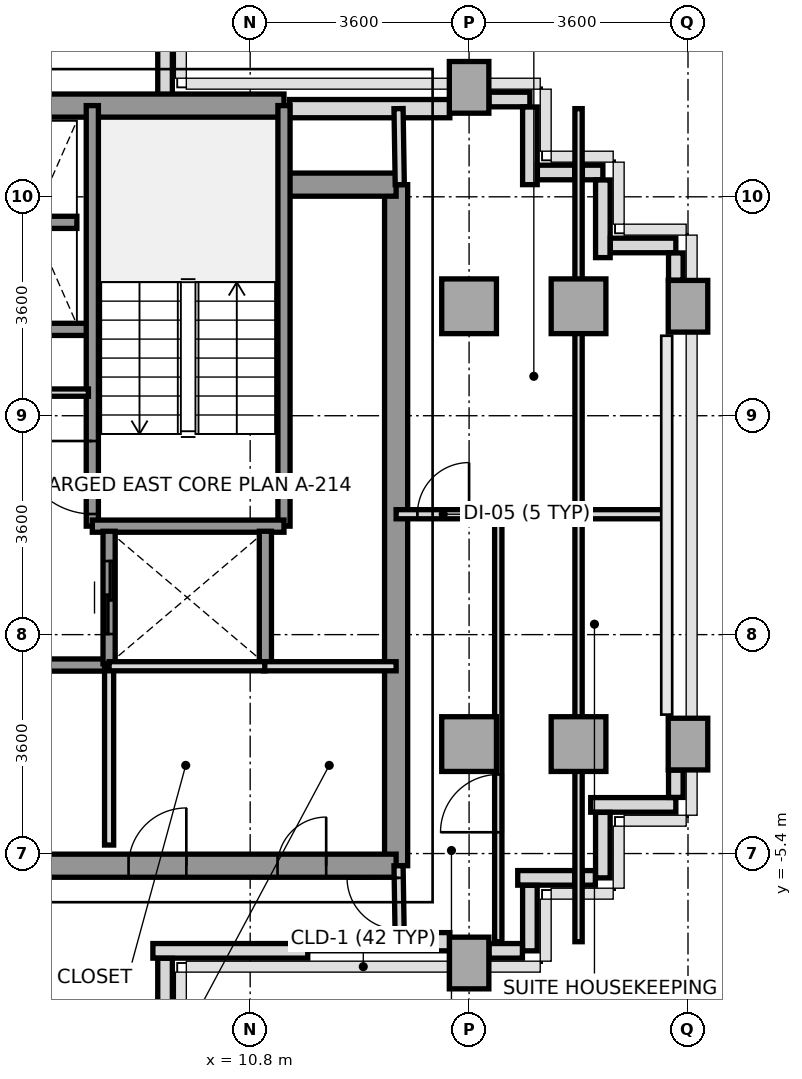
"""IFC4 building model, lengths in metres.
Left out: names, types, materials, properties, quantities, classifications, styles, units other than length and angle.
Written with IfcOpenShell. Run it as: python <this file> out.ifc"""

import sys

from ifc_helpers import new_model, si_unit, direction, frame, frame_2d, origin, origin_2d, place, context, subcontext, project, spatial, rectangle, extrude, source, transform, mapped, element, fill, save


model = new_model("IFC4")
c1 = context("Model", 3, precision=1e-05, world=origin(), true_north=direction((0.0, 1.0)))
c2 = subcontext(c1, "Body", "Model", "MODEL_VIEW")
j1 = project(units=[si_unit("LENGTHUNIT", "METRE"), si_unit("PLANEANGLEUNIT", "RADIAN")], contexts=[c1])
p1 = place(None, origin())
s1 = spatial("IfcSite", under=j1, at=p1, CompositionType="ELEMENT")
p2 = place(p1, origin())
s2 = spatial("IfcBuilding", under=s1, at=p2, CompositionType="ELEMENT")
p3 = place(p2, frame((0.0, 0.0, 201.2)))
s3 = spatial("IfcBuildingStorey", under=s2, at=p3, CompositionType="ELEMENT", Elevation=201.2)
m1 = source(origin(), c2, "Body", "SweptSolid", [
    extrude(rectangle(XDim=0.65, YDim=0.85, at=origin_2d()), origin(), (0.0, 0.0, 1.0), 3.2),
])
p4 = place(p3, frame((14.4, -7.2, 0.0), z_axis=(0.0, 0.0, 1.0), x_axis=(1.0, 0.0, 0.0)))
e1 = element("IfcColumn", 1, at=p4, inside=s3, PredefinedType="COLUMN", context=c2, shape_type="MappedRepresentation", body=[
    mapped(m1, transform((0.0, 0.0, 0.0), x_axis=(1.0, 0.0, 0.0), y_axis=(0.0, 1.0, 0.0), z_axis=(0.0, 0.0, 1.0), scale=1.0)),
])
m2 = source(origin(), c2, "Body", "SweptSolid", [
    extrude(rectangle(XDim=0.9, YDim=0.9, at=origin_2d()), origin(), (0.0, 0.0, 1.0), 3.2),
])
for number, where, z_axis, x_axis in (
    (2, (14.4, -3.6, 0.0), (0.0, 0.0, 1.0), (1.0, 0.0, 0.0)),
    (3, (14.4, 3.6, 0.0), (0.0, 0.0, 1.0), (1.0, 0.0, 0.0)),
):
    element("IfcColumn", number, at=place(p3, frame(where, z_axis=z_axis, x_axis=x_axis)), inside=s3, PredefinedType="COLUMN", context=c2, shape_type="MappedRepresentation", body=[
        mapped(m2, transform((0.0, 0.0, 0.0), x_axis=(1.0, 0.0, 0.0), y_axis=(0.0, 1.0, 0.0), z_axis=(0.0, 0.0, 1.0), scale=1.0)),
    ])
p5 = place(p3, frame((14.4, 7.2, 0.0), z_axis=(0.0, 0.0, 1.0), x_axis=(1.0, 0.0, 0.0)))
e4 = element("IfcColumn", 4, at=p5, inside=s3, PredefinedType="COLUMN", context=c2, shape_type="MappedRepresentation", body=[
    mapped(m1, transform((0.0, 0.0, 0.0), x_axis=(1.0, 0.0, 0.0), y_axis=(0.0, 1.0, 0.0), z_axis=(0.0, 0.0, 1.0), scale=1.0)),
])
for number, where, z_axis, x_axis in (
    (5, (16.2, -3.6, 0.0), (0.0, 0.0, 1.0), (1.0, 0.0, 0.0)),
    (6, (16.2, 3.6, 0.0), (0.0, 0.0, 1.0), (1.0, 0.0, 0.0)),
):
    element("IfcColumn", number, at=place(p3, frame(where, z_axis=z_axis, x_axis=x_axis)), inside=s3, PredefinedType="COLUMN", context=c2, shape_type="MappedRepresentation", body=[
        mapped(m2, transform((0.0, 0.0, 0.0), x_axis=(1.0, 0.0, 0.0), y_axis=(0.0, 1.0, 0.0), z_axis=(0.0, 0.0, 1.0), scale=1.0)),
    ])
for number, where, z_axis, x_axis in (
    (7, (18.0, -3.6, 0.0), (0.0, 0.0, 1.0), (1.0, 0.0, 0.0)),
    (8, (18.0, 3.6, 0.0), (0.0, 0.0, 1.0), (1.0, 0.0, 0.0)),
):
    element("IfcColumn", number, at=place(p3, frame(where, z_axis=z_axis, x_axis=x_axis)), inside=s3, PredefinedType="COLUMN", context=c2, shape_type="MappedRepresentation", body=[
        mapped(m1, transform((0.0, 0.0, 0.0), x_axis=(1.0, 0.0, 0.0), y_axis=(0.0, 1.0, 0.0), z_axis=(0.0, 0.0, 1.0), scale=1.0)),
    ])
p6 = place(p3, frame((11.448, 6.85, 0.0), z_axis=(0.0, 0.0, 1.0), x_axis=(1.0, 0.0, 0.0)))
e9 = element("IfcWall", 9, at=p6, inside=s3, PredefinedType="SOLIDWALL", context=c2, shape_type="SweptSolid", body=[
    extrude(rectangle(XDim=2.635, YDim=0.3, at=frame_2d((1.317, 0.0))), origin(), (0.0, 0.0, 1.0), 3.2),
])
p7 = place(p3, frame((11.75, -6.85, 0.0), z_axis=(0.0, 0.0, 1.0), x_axis=(1.0, 0.0, 0.0)))
e10 = element("IfcWall", 10, at=p7, inside=s3, PredefinedType="SOLIDWALL", context=c2, shape_type="SweptSolid", body=[
    extrude(rectangle(XDim=2.333, YDim=0.3, at=frame_2d((1.167, 0.0))), origin(), (0.0, 0.0, 1.0), 3.2),
])
p8 = place(p3, frame((17.8, -4.6, 0.0), z_axis=(0.0, 0.0, 1.0), x_axis=(-1.0, 0.0, 0.0)))
e11 = element("IfcWall", 11, at=p8, inside=s3, PredefinedType="PARAPET", context=c2, shape_type="SweptSolid", body=[
    extrude(rectangle(XDim=1.4, YDim=0.24, at=frame_2d((0.7, 0.0))), origin(), (0.0, 0.0, 1.0), 1.15),
])
p9 = place(p3, frame((16.6, -4.723, 0.0), z_axis=(0.0, 0.0, 1.0), x_axis=(0.0, -1.0, 0.0)))
e12 = element("IfcWall", 12, at=p9, inside=s3, PredefinedType="PARAPET", context=c2, shape_type="SweptSolid", body=[
    extrude(rectangle(XDim=1.077, YDim=0.24, at=frame_2d((0.539, 0.0))), origin(), (0.0, 0.0, 1.0), 1.15),
])
p10 = place(p3, frame((16.477, -5.8, 0.0), z_axis=(0.0, 0.0, 1.0), x_axis=(-1.0, 0.0, 0.0)))
e13 = element("IfcWall", 13, at=p10, inside=s3, PredefinedType="PARAPET", context=c2, shape_type="SweptSolid", body=[
    extrude(rectangle(XDim=0.214, YDim=0.24, at=frame_2d((0.107, 0.0))), origin(), (0.0, 0.0, 1.0), 1.15),
])
p11 = place(p3, frame((16.137, -5.8, 0.0), z_axis=(0.0, 0.0, 1.0), x_axis=(-1.0, 0.0, 0.0)))
e14 = element("IfcWall", 14, at=p11, inside=s3, PredefinedType="PARAPET", context=c2, shape_type="SweptSolid", body=[
    extrude(rectangle(XDim=0.937, YDim=0.24, at=frame_2d((0.469, 0.0))), origin(), (0.0, 0.0, 1.0), 1.15),
])
p12 = place(p3, frame((15.4, -5.923, 0.0), z_axis=(0.0, 0.0, 1.0), x_axis=(0.0, -1.0, 0.0)))
e15 = element("IfcWall", 15, at=p12, inside=s3, PredefinedType="PARAPET", context=c2, shape_type="SweptSolid", body=[
    extrude(rectangle(XDim=1.077, YDim=0.24, at=frame_2d((0.539, 0.0))), origin(), (0.0, 0.0, 1.0), 1.15),
])
p13 = place(p3, frame((15.277, -7.0, 0.0), z_axis=(0.0, 0.0, 1.0), x_axis=(-1.0, 0.0, 0.0)))
e16 = element("IfcWall", 16, at=p13, inside=s3, PredefinedType="PARAPET", context=c2, shape_type="SweptSolid", body=[
    extrude(rectangle(XDim=0.549, YDim=0.24, at=frame_2d((0.274, 0.0))), origin(), (0.0, 0.0, 1.0), 1.15),
])
p14 = place(p3, frame((11.747, -7.0, 0.0), z_axis=(0.0, 0.0, 1.0), x_axis=(-1.0, 0.0, 0.0)))
e17 = element("IfcWall", 17, at=p14, inside=s3, PredefinedType="PARAPET", context=c2, shape_type="SweptSolid", body=[
    extrude(rectangle(XDim=2.547, YDim=0.24, at=frame_2d((1.273, 0.0))), origin(), (0.0, 0.0, 1.0), 1.15),
])
p15 = place(p3, frame((9.4, -7.123, 0.0), z_axis=(0.0, 0.0, 1.0), x_axis=(0.0, -1.0, 0.0)))
e18 = element("IfcWall", 18, at=p15, inside=s3, PredefinedType="PARAPET", context=c2, shape_type="SweptSolid", body=[
    extrude(rectangle(XDim=1.424, YDim=0.24, at=frame_2d((0.712, 0.0))), origin(), (0.0, 0.0, 1.0), 1.15),
])
p16 = place(p3, frame((9.4, 8.547, 0.0), z_axis=(0.0, 0.0, 1.0), x_axis=(0.0, -1.0, 0.0)))
e19 = element("IfcWall", 19, at=p16, inside=s3, PredefinedType="PARAPET", context=c2, shape_type="SweptSolid", body=[
    extrude(rectangle(XDim=1.594, YDim=0.24, at=frame_2d((0.797, 0.0))), origin(), (0.0, 0.0, 1.0), 1.15),
])
p17 = place(p3, frame((14.728, 7.0, 0.0), z_axis=(0.0, 0.0, 1.0), x_axis=(1.0, 0.0, 0.0)))
e20 = element("IfcWall", 20, at=p17, inside=s3, PredefinedType="PARAPET", context=c2, shape_type="SweptSolid", body=[
    extrude(rectangle(XDim=0.672, YDim=0.24, at=frame_2d((0.336, 0.0))), origin(), (0.0, 0.0, 1.0), 1.15),
])
p18 = place(p3, frame((15.4, 6.877, 0.0), z_axis=(0.0, 0.0, 1.0), x_axis=(0.0, -1.0, 0.0)))
e21 = element("IfcWall", 21, at=p18, inside=s3, PredefinedType="PARAPET", context=c2, shape_type="SweptSolid", body=[
    extrude(rectangle(XDim=1.277, YDim=0.24, at=frame_2d((0.638, 0.0))), origin(), (0.0, 0.0, 1.0), 1.15),
])
p19 = place(p3, frame((15.523, 5.8, 0.0), z_axis=(0.0, 0.0, 1.0), x_axis=(1.0, 0.0, 0.0)))
e22 = element("IfcWall", 22, at=p19, inside=s3, PredefinedType="PARAPET", context=c2, shape_type="SweptSolid", body=[
    extrude(rectangle(XDim=0.614, YDim=0.24, at=frame_2d((0.307, 0.0))), origin(), (0.0, 0.0, 1.0), 1.15),
])
p20 = place(p3, frame((16.263, 5.8, 0.0), z_axis=(0.0, 0.0, 1.0), x_axis=(1.0, 0.0, 0.0)))
e23 = element("IfcWall", 23, at=p20, inside=s3, PredefinedType="PARAPET", context=c2, shape_type="SweptSolid", body=[
    extrude(rectangle(XDim=0.337, YDim=0.24, at=frame_2d((0.168, 0.0))), origin(), (0.0, 0.0, 1.0), 1.15),
])
p21 = place(p3, frame((16.6, 5.677, 0.0), z_axis=(0.0, 0.0, 1.0), x_axis=(0.0, -1.0, 0.0)))
e24 = element("IfcWall", 24, at=p21, inside=s3, PredefinedType="PARAPET", context=c2, shape_type="SweptSolid", body=[
    extrude(rectangle(XDim=1.277, YDim=0.24, at=frame_2d((0.639, 0.0))), origin(), (0.0, 0.0, 1.0), 1.15),
])
p22 = place(p3, frame((16.723, 4.6, 0.0), z_axis=(0.0, 0.0, 1.0), x_axis=(1.0, 0.0, 0.0)))
e25 = element("IfcWall", 25, at=p22, inside=s3, PredefinedType="PARAPET", context=c2, shape_type="SweptSolid", body=[
    extrude(rectangle(XDim=1.077, YDim=0.24, at=frame_2d((0.539, 0.0))), origin(), (0.0, 0.0, 1.0), 1.15),
])
for number, where, z_axis, x_axis in (
    (26, (17.8, 4.477, 0.0), (0.0, 0.0, 1.0), (0.0, -1.0, 0.0)),
    (27, (17.8, -4.028, 0.0), (0.0, 0.0, 1.0), (0.0, -1.0, 0.0)),
):
    element("IfcWall", number, at=place(p3, frame(where, z_axis=z_axis, x_axis=x_axis)), inside=s3, PredefinedType="PARAPET", context=c2, shape_type="SweptSolid", body=[
        extrude(rectangle(XDim=0.449, YDim=0.24, at=frame_2d((0.225, 0.0))), origin(), (0.0, 0.0, 1.0), 1.15),
    ])
p23 = place(p3, frame((13.2, -5.6, 0.0), z_axis=(0.0, 0.0, 1.0), x_axis=(0.0, 1.0, 0.0)))
e28 = element("IfcWall", 28, at=p23, inside=s3, PredefinedType="SHEAR", context=c2, shape_type="SweptSolid", body=[
    extrude(rectangle(XDim=11.2, YDim=0.38, at=frame_2d((5.6, 0.0))), origin(), (0.0, 0.0, 1.0), 3.2),
])
p24 = place(p3, frame((5.4, 6.9, 0.0), z_axis=(0.0, 0.0, 1.0), x_axis=(1.0, 0.0, 0.0)))
e29 = element("IfcWall", 29, at=p24, inside=s3, PredefinedType="SHEAR", context=c2, shape_type="SweptSolid", body=[
    extrude(rectangle(XDim=5.956, YDim=0.38, at=frame_2d((2.978, 0.0))), origin(), (0.0, 0.0, 1.0), 3.2),
])
p25 = place(p3, frame((11.356, 5.6, 0.0), z_axis=(0.0, 0.0, 1.0), x_axis=(1.0, 0.0, 0.0)))
e30 = element("IfcWall", 30, at=p25, inside=s3, PredefinedType="SHEAR", context=c2, shape_type="SweptSolid", body=[
    extrude(rectangle(XDim=1.844, YDim=0.38, at=frame_2d((0.922, 0.0))), origin(), (0.0, 0.0, 1.0), 3.2),
])
p26 = place(p3, frame((5.4, -5.6, 0.0), z_axis=(0.0, 0.0, 1.0), x_axis=(1.0, 0.0, 0.0)))
e31 = element("IfcWall", 31, at=p26, inside=s3, PredefinedType="SHEAR", context=c2, shape_type="SweptSolid", body=[
    extrude(rectangle(XDim=7.8, YDim=0.38, at=frame_2d((3.9, 0.0))), origin(), (0.0, 0.0, 1.0), 3.2),
])
p27 = place(p26, frame((5.85, 0.0, 0.0)))
e32 = element("IfcOpeningElement", 32, at=p27, cuts=e31, PredefinedType="OPENING", context=c2, shape_type="SweptSolid", body=[
    extrude(rectangle(XDim=0.8, YDim=2.1, at=frame_2d((0.4, 1.05))), frame((0.0, 0.2, 0.0), z_axis=(0.0, -1.0, 0.0), x_axis=(1.0, 0.0, 0.0)), (0.0, 0.0, 1.0), 0.4),
])
p28 = place(p26, frame((3.4, 0.0, 0.0)))
e33 = element("IfcOpeningElement", 33, at=p28, cuts=e31, PredefinedType="OPENING", context=c2, shape_type="SweptSolid", body=[
    extrude(rectangle(XDim=0.95, YDim=2.15, at=frame_2d((0.475, 1.075))), frame((0.0, 0.2, 0.0), z_axis=(0.0, -1.0, 0.0), x_axis=(1.0, 0.0, 0.0)), (0.0, 0.0, 1.0), 0.4),
])
p29 = place(p3, frame((5.4, 3.22, 0.0), z_axis=(0.0, 0.0, 1.0), x_axis=(1.0, 0.0, 0.0)))
e34 = element("IfcWall", 34, at=p29, inside=s3, PredefinedType="SOLIDWALL", context=c2, shape_type="SweptSolid", body=[
    extrude(rectangle(XDim=2.78, YDim=0.2, at=frame_2d((1.39, 0.0))), origin(), (0.0, 0.0, 1.0), 3.2),
])
p30 = place(p3, frame((5.4, -2.3, 0.0), z_axis=(0.0, 0.0, 1.0), x_axis=(1.0, 0.0, 0.0)))
e35 = element("IfcWall", 35, at=p30, inside=s3, PredefinedType="SOLIDWALL", context=c2, shape_type="SweptSolid", body=[
    extrude(rectangle(XDim=3.08, YDim=0.2, at=frame_2d((1.54, 0.0))), origin(), (0.0, 0.0, 1.0), 3.2),
])
p31 = place(p3, frame((8.204, -0.016, 0.0), z_axis=(0.0, 0.0, 1.0), x_axis=(0.0, 1.0, 0.0)))
e36 = element("IfcWall", 36, at=p31, inside=s3, PredefinedType="SOLIDWALL", context=c2, shape_type="SweptSolid", body=[
    extrude(rectangle(XDim=6.916, YDim=0.2, at=frame_2d((3.458, 0.0))), origin(), (0.0, 0.0, 1.0), 3.2),
])
p32 = place(p31, frame((0.2, 0.0, 0.0)))
e37 = element("IfcOpeningElement", 37, at=p32, cuts=e36, PredefinedType="OPENING", context=c2, shape_type="SweptSolid", body=[
    extrude(rectangle(XDim=1.2, YDim=2.2, at=frame_2d((0.6, 1.1))), frame((0.0, 0.11, 0.0), z_axis=(0.0, -1.0, 0.0), x_axis=(1.0, 0.0, 0.0)), (0.0, 0.0, 1.0), 0.22),
])
p33 = place(p3, frame((11.356, -0.016, 0.0), z_axis=(0.0, 0.0, 1.0), x_axis=(0.0, 1.0, 0.0)))
e38 = element("IfcWall", 38, at=p33, inside=s3, PredefinedType="SOLIDWALL", context=c2, shape_type="SweptSolid", body=[
    extrude(rectangle(XDim=6.916, YDim=0.2, at=frame_2d((3.458, 0.0))), origin(), (0.0, 0.0, 1.0), 3.2),
])
p34 = place(p3, frame((8.204, -0.016, 0.0), z_axis=(0.0, 0.0, 1.0), x_axis=(1.0, 0.0, 0.0)))
e39 = element("IfcWall", 39, at=p34, inside=s3, PredefinedType="SOLIDWALL", context=c2, shape_type="SweptSolid", body=[
    extrude(rectangle(XDim=3.152, YDim=0.2, at=frame_2d((1.576, 0.0))), origin(), (0.0, 0.0, 1.0), 3.2),
])
p35 = place(p3, frame((8.48, -2.28, 0.0), z_axis=(0.0, 0.0, 1.0), x_axis=(0.0, 1.0, 0.0)))
e40 = element("IfcWall", 40, at=p35, inside=s3, PredefinedType="SOLIDWALL", context=c2, shape_type="SweptSolid", body=[
    extrude(rectangle(XDim=2.18, YDim=0.2, at=frame_2d((1.09, 0.0))), origin(), (0.0, 0.0, 1.0), 3.2),
])
p36 = place(p35, frame((0.49, 0.0, 0.0)))
e41 = element("IfcOpeningElement", 41, at=p36, cuts=e40, PredefinedType="OPENING", context=c2, shape_type="SweptSolid", body=[
    extrude(rectangle(XDim=1.2, YDim=2.2, at=frame_2d((0.6, 1.1))), frame((0.0, 0.11, 0.0), z_axis=(0.0, -1.0, 0.0), x_axis=(1.0, 0.0, 0.0)), (0.0, 0.0, 1.0), 0.22),
])
p37 = place(p3, frame((11.05, -2.28, 0.0), z_axis=(0.0, 0.0, 1.0), x_axis=(0.0, 1.0, 0.0)))
e42 = element("IfcWall", 42, at=p37, inside=s3, PredefinedType="SOLIDWALL", context=c2, shape_type="SweptSolid", body=[
    extrude(rectangle(XDim=2.18, YDim=0.2, at=frame_2d((1.09, 0.0))), origin(), (0.0, 0.0, 1.0), 3.2),
])
p38 = place(p3, frame((6.48, 4.98, 0.0), z_axis=(0.0, 0.0, 1.0), x_axis=(1.0, 0.0, 0.0)))
e43 = element("IfcWall", 43, at=p38, inside=s3, PredefinedType="SOLIDWALL", context=c2, shape_type="SweptSolid", body=[
    extrude(rectangle(XDim=1.47, YDim=0.2, at=frame_2d((0.735, 0.0))), origin(), (0.0, 0.0, 1.0), 3.2),
])
p39 = place(p3, frame((5.75, 2.18, 0.0), z_axis=(0.0, 0.0, 1.0), x_axis=(1.0, 0.0, 0.0)))
e44 = element("IfcWall", 44, at=p39, inside=s3, PredefinedType="PARTITIONING", context=c2, shape_type="SweptSolid", body=[
    extrude(rectangle(XDim=2.39, YDim=0.12, at=frame_2d((1.195, 0.0))), origin(), (0.0, 0.0, 1.0), 2.3),
])
p40 = place(p3, frame((11.02, -2.32, 0.0), z_axis=(0.0, 0.0, 1.0), x_axis=(1.0, 0.0, 0.0)))
e45 = element("IfcWall", 45, at=p40, inside=s3, PredefinedType="PARTITIONING", context=c2, shape_type="SweptSolid", body=[
    extrude(rectangle(XDim=2.18, YDim=0.15, at=frame_2d((1.09, 0.0))), origin(), (0.0, 0.0, 1.0), 3.2),
])
p41 = place(p3, frame((8.48, -5.26, 0.0), z_axis=(0.0, 0.0, 1.0), x_axis=(0.0, 1.0, 0.0)))
e46 = element("IfcWall", 46, at=p41, inside=s3, PredefinedType="PARTITIONING", context=c2, shape_type="SweptSolid", body=[
    extrude(rectangle(XDim=2.94, YDim=0.15, at=frame_2d((1.47, 0.0))), origin(), (0.0, 0.0, 1.0), 3.2),
])
p42 = place(p3, frame((8.48, -2.32, 0.0), z_axis=(0.0, 0.0, 1.0), x_axis=(1.0, 0.0, 0.0)))
e47 = element("IfcWall", 47, at=p42, inside=s3, PredefinedType="PARTITIONING", context=c2, shape_type="SweptSolid", body=[
    extrude(rectangle(XDim=2.56, YDim=0.15, at=frame_2d((1.28, 0.0))), origin(), (0.0, 0.0, 1.0), 3.2),
])
p43 = place(p3, frame((13.26, 5.6, 0.0), z_axis=(0.0, 0.0, 1.0), x_axis=(-0.016013571389, 0.999871774545, 0.0)))
e48 = element("IfcWall", 48, at=p43, inside=s3, PredefinedType="PARTITIONING", context=c2, shape_type="SweptSolid", body=[
    extrude(rectangle(XDim=1.25, YDim=0.15, at=frame_2d((0.625, 0.0))), origin(), (0.0, 0.0, 1.0), 3.2),
])
p44 = place(p3, frame((13.26, -6.85, 0.0), z_axis=(0.0, 0.0, 1.0), x_axis=(-0.016013571389, 0.999871774545, 0.0)))
e49 = element("IfcWall", 49, at=p44, inside=s3, PredefinedType="PARTITIONING", context=c2, shape_type="SweptSolid", body=[
    extrude(rectangle(XDim=1.25, YDim=0.15, at=frame_2d((0.625, 0.0))), origin(), (0.0, 0.0, 1.0), 3.2),
])
p45 = place(p44, frame((0.2, 0.0, 0.0)))
e50 = element("IfcOpeningElement", 50, at=p45, cuts=e49, PredefinedType="OPENING", context=c2, shape_type="SweptSolid", body=[
    extrude(rectangle(XDim=0.85, YDim=2.1, at=frame_2d((0.425, 1.05))), frame((0.0, 0.085, 0.0), z_axis=(0.0, -1.0, 0.0), x_axis=(1.0, 0.0, 0.0)), (0.0, 0.0, 1.0), 0.17),
])
p46 = place(p3, frame((16.2, -6.85, 0.0), z_axis=(0.0, 0.0, 1.0), x_axis=(0.0, 1.0, 0.0)))
e51 = element("IfcWall", 51, at=p46, inside=s3, PredefinedType="PARTITIONING", context=c2, shape_type="SweptSolid", body=[
    extrude(rectangle(XDim=13.7, YDim=0.12, at=frame_2d((6.85, 0.0))), origin(), (0.0, 0.0, 1.0), 2.8),
])
p47 = place(p3, frame((14.9, 0.18, 0.0), z_axis=(0.0, 0.0, 1.0), x_axis=(1.0, 0.0, 0.0)))
e52 = element("IfcWall", 52, at=p47, inside=s3, PredefinedType="PARTITIONING", context=c2, shape_type="SweptSolid", body=[
    extrude(rectangle(XDim=2.75, YDim=0.15, at=frame_2d((1.375, 0.0))), origin(), (0.0, 0.0, 1.0), 2.8),
])
p48 = place(p3, frame((14.88, -6.85, 0.0), z_axis=(0.0, 0.0, 1.0), x_axis=(0.0, 1.0, 0.0)))
e53 = element("IfcWall", 53, at=p48, inside=s3, PredefinedType="PARTITIONING", context=c2, shape_type="SweptSolid", body=[
    extrude(rectangle(XDim=7.03, YDim=0.12, at=frame_2d((3.515, 0.0))), origin(), (0.0, 0.0, 1.0), 3.2),
])
p49 = place(p48, frame((1.8, 0.0, 0.0)))
e54 = element("IfcOpeningElement", 54, at=p49, cuts=e53, PredefinedType="OPENING", context=c2, shape_type="SweptSolid", body=[
    extrude(rectangle(XDim=0.95, YDim=2.15, at=frame_2d((0.475, 1.075))), frame((0.0, 0.07, 0.0), z_axis=(0.0, -1.0, 0.0), x_axis=(1.0, 0.0, 0.0)), (0.0, 0.0, 1.0), 0.14),
])
p50 = place(p3, frame((13.2, 0.18, 0.0), z_axis=(0.0, 0.0, 1.0), x_axis=(1.0, 0.0, 0.0)))
e55 = element("IfcWall", 55, at=p50, inside=s3, PredefinedType="PARTITIONING", context=c2, shape_type="SweptSolid", body=[
    extrude(rectangle(XDim=1.7, YDim=0.15, at=frame_2d((0.85, 0.0))), origin(), (0.0, 0.0, 1.0), 2.8),
])
p51 = place(p50, frame((0.35, 0.0, 0.0)))
e56 = element("IfcOpeningElement", 56, at=p51, cuts=e55, PredefinedType="OPENING", context=c2, shape_type="SweptSolid", body=[
    extrude(rectangle(XDim=0.85, YDim=2.1, at=frame_2d((0.425, 1.05))), frame((0.0, 0.085, 0.0), z_axis=(0.0, -1.0, 0.0), x_axis=(1.0, 0.0, 0.0)), (0.0, 0.0, 1.0), 0.17),
])
m3 = source(origin(), c2, "Body", "SweptSolid", [
    extrude(rectangle(XDim=1.2, YDim=2.2, at=frame_2d((0.6, 1.1))), frame((0.0, 0.025, 0.0), z_axis=(0.0, -1.0, 0.0), x_axis=(1.0, 0.0, 0.0)), (0.0, 0.0, 1.0), 0.05),
])
p52 = place(p32, origin())
e57 = element("IfcDoor", 57, at=p52, inside=s3, OperationType="SINGLE_SWING_RIGHT", PredefinedType="DOOR", context=c2, shape_type="MappedRepresentation", body=[
    mapped(m3, transform((0.0, 0.0, 0.0), x_axis=(1.0, 0.0, 0.0), y_axis=(0.0, 1.0, 0.0), z_axis=(0.0, 0.0, 1.0), scale=1.0)),
])
fill(e37, e57)
m4 = source(origin(), c2, "Body", "SweptSolid", [
    extrude(rectangle(XDim=0.8, YDim=2.1, at=frame_2d((0.4, 1.05))), frame((0.0, 0.025, 0.0), z_axis=(0.0, -1.0, 0.0), x_axis=(1.0, 0.0, 0.0)), (0.0, 0.0, 1.0), 0.05),
])
p53 = place(p27, origin())
e58 = element("IfcDoor", 58, at=p53, inside=s3, OperationType="SINGLE_SWING_RIGHT", PredefinedType="DOOR", context=c2, shape_type="MappedRepresentation", body=[
    mapped(m4, transform((0.0, 0.0, 0.0), x_axis=(1.0, 0.0, 0.0), y_axis=(0.0, 1.0, 0.0), z_axis=(0.0, 0.0, 1.0), scale=1.0)),
])
fill(e32, e58)
m5 = source(origin(), c2, "Body", "SweptSolid", [
    extrude(rectangle(XDim=0.95, YDim=2.15, at=frame_2d((0.475, 1.075))), frame((0.0, 0.025, 0.0), z_axis=(0.0, -1.0, 0.0), x_axis=(1.0, 0.0, 0.0)), (0.0, 0.0, 1.0), 0.05),
])
p54 = place(p28, origin())
e59 = element("IfcDoor", 59, at=p54, inside=s3, OperationType="SINGLE_SWING_RIGHT", PredefinedType="DOOR", context=c2, shape_type="MappedRepresentation", body=[
    mapped(m5, transform((0.0, 0.0, 0.0), x_axis=(1.0, 0.0, 0.0), y_axis=(0.0, 1.0, 0.0), z_axis=(0.0, 0.0, 1.0), scale=1.0)),
])
fill(e33, e59)
p55 = place(p36, origin())
e60 = element("IfcDoor", 60, at=p55, inside=s3, OperationType="SLIDING_TO_RIGHT", PredefinedType="DOOR", context=c2, shape_type="MappedRepresentation", body=[
    mapped(m3, transform((0.0, 0.0, 0.0), x_axis=(1.0, 0.0, 0.0), y_axis=(0.0, 1.0, 0.0), z_axis=(0.0, 0.0, 1.0), scale=1.0)),
])
fill(e41, e60)
m6 = source(origin(), c2, "Body", "SweptSolid", [
    extrude(rectangle(XDim=0.85, YDim=2.1, at=frame_2d((0.425, 1.05))), frame((0.0, 0.025, 0.0), z_axis=(0.0, -1.0, 0.0), x_axis=(1.0, 0.0, 0.0)), (0.0, 0.0, 1.0), 0.05),
])
p56 = place(p45, origin())
e61 = element("IfcDoor", 61, at=p56, inside=s3, OperationType="SINGLE_SWING_RIGHT", PredefinedType="DOOR", context=c2, shape_type="MappedRepresentation", body=[
    mapped(m6, transform((0.0, 0.0, 0.0), x_axis=(1.0, 0.0, 0.0), y_axis=(0.0, 1.0, 0.0), z_axis=(0.0, 0.0, 1.0), scale=1.0)),
])
fill(e50, e61)
p57 = place(p49, origin())
e62 = element("IfcDoor", 62, at=p57, inside=s3, OperationType="SINGLE_SWING_LEFT", PredefinedType="DOOR", context=c2, shape_type="MappedRepresentation", body=[
    mapped(m5, transform((0.0, 0.0, 0.0), x_axis=(1.0, 0.0, 0.0), y_axis=(0.0, 1.0, 0.0), z_axis=(0.0, 0.0, 1.0), scale=1.0)),
])
fill(e54, e62)
p58 = place(p51, origin())
e63 = element("IfcDoor", 63, at=p58, inside=s3, OperationType="SINGLE_SWING_RIGHT", PredefinedType="DOOR", context=c2, shape_type="MappedRepresentation", body=[
    mapped(m6, transform((0.0, 0.0, 0.0), x_axis=(1.0, 0.0, 0.0), y_axis=(0.0, 1.0, 0.0), z_axis=(0.0, 0.0, 1.0), scale=1.0)),
])
fill(e56, e63)
save(model, sys.argv[1])
